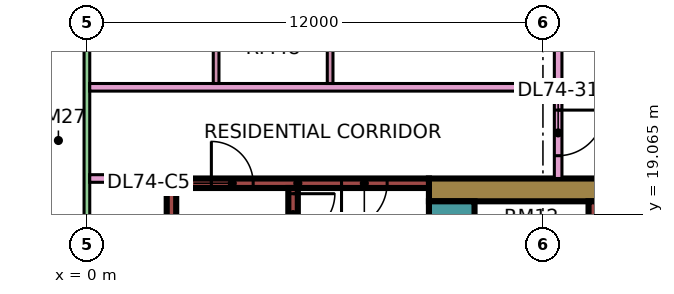
"""IFC4 building model, lengths in metres.
Left out: names, types, materials, properties, quantities, classifications, styles, units other than length and angle.
Written with IfcOpenShell. Run it as: python <this file> out.ifc"""

import sys

from ifc_helpers import new_model, si_unit, direction, frame, frame_2d, origin, place, context, subcontext, project, spatial, rectangle, extrude, element, fill, save


model = new_model("IFC4")
c1 = context("Model", 3, precision=1e-05, world=origin(), true_north=direction((0.0, 1.0)))
c2 = subcontext(c1, "Body", "Model", "MODEL_VIEW")
j1 = project(units=[si_unit("LENGTHUNIT", "METRE"), si_unit("PLANEANGLEUNIT", "RADIAN")], contexts=[c1])
p1 = place(None, origin())
s1 = spatial("IfcSite", under=j1, at=p1, CompositionType="ELEMENT")
p2 = place(p1, origin())
s2 = spatial("IfcBuilding", under=s1, at=p2, CompositionType="ELEMENT")
p3 = place(p2, frame((0.0, 0.0, 314.65)))
s3 = spatial("IfcBuildingStorey", under=s2, at=p3, CompositionType="ELEMENT", Elevation=314.65)
p4 = place(p3, frame((9.0, 19.7, 0.0), z_axis=(0.0, 0.0, 1.0), x_axis=(1.0, 0.0, 0.0)))
e1 = element("IfcWall", 1, at=p4, inside=s3, PredefinedType="SHEAR", context=c2, shape_type="SweptSolid", body=[
    extrude(rectangle(XDim=25.0, YDim=0.6, at=frame_2d((12.5, 0.0))), origin(), (0.0, 0.0, 1.0), 3.75),
])
p5 = place(p4, frame((19.1, 0.0, 0.0)))
e2 = element("IfcOpeningElement", 2, at=p5, cuts=e1, PredefinedType="OPENING", context=c2, shape_type="SweptSolid", body=[
    extrude(rectangle(XDim=1.8, YDim=2.4, at=frame_2d((0.9, 1.2))), frame((0.0, 0.31, 0.0), z_axis=(0.0, -1.0, 0.0), x_axis=(1.0, 0.0, 0.0)), (0.0, 0.0, 1.0), 0.62),
])
p6 = place(p3, frame((9.6, 7.6, 0.0), z_axis=(0.0, 0.0, 1.0), x_axis=(0.0, 1.0, 0.0)))
e3 = element("IfcWall", 3, at=p6, inside=s3, PredefinedType="SHEAR", context=c2, shape_type="SweptSolid", body=[
    extrude(rectangle(XDim=11.8, YDim=1.2, at=frame_2d((5.9, 0.0))), origin(), (0.0, 0.0, 1.0), 3.75),
])
p7 = place(p6, frame((4.275, 0.0, 0.0)))
e4 = element("IfcOpeningElement", 4, at=p7, cuts=e3, PredefinedType="OPENING", context=c2, shape_type="SweptSolid", body=[
    extrude(rectangle(XDim=1.1, YDim=2.2, at=frame_2d((0.55, 1.1))), frame((0.0, 0.61, 0.0), z_axis=(0.0, -1.0, 0.0), x_axis=(1.0, 0.0, 0.0)), (0.0, 0.0, 1.0), 1.22),
])
p8 = place(p6, frame((6.775, 0.0, 0.0)))
e5 = element("IfcOpeningElement", 5, at=p8, cuts=e3, PredefinedType="OPENING", context=c2, shape_type="SweptSolid", body=[
    extrude(rectangle(XDim=1.1, YDim=2.2, at=frame_2d((0.55, 1.1))), frame((0.0, 0.61, 0.0), z_axis=(0.0, -1.0, 0.0), x_axis=(1.0, 0.0, 0.0)), (0.0, 0.0, 1.0), 1.22),
])
p9 = place(p6, frame((9.7, 0.0, 0.0)))
e6 = element("IfcOpeningElement", 6, at=p9, cuts=e3, PredefinedType="OPENING", context=c2, shape_type="SweptSolid", body=[
    extrude(rectangle(XDim=1.1, YDim=2.2, at=frame_2d((0.55, 1.1))), frame((0.0, 0.61, 0.0), z_axis=(0.0, -1.0, 0.0), x_axis=(1.0, 0.0, 0.0)), (0.0, 0.0, 1.0), 1.22),
])
p10 = place(p6, frame((1.95, 0.0, 0.0)))
e7 = element("IfcOpeningElement", 7, at=p10, cuts=e3, PredefinedType="OPENING", context=c2, shape_type="SweptSolid", body=[
    extrude(rectangle(XDim=0.9, YDim=2.1, at=frame_2d((0.45, 1.05))), frame((0.0, 0.61, 0.0), z_axis=(0.0, -1.0, 0.0), x_axis=(1.0, 0.0, 0.0)), (0.0, 0.0, 1.0), 1.22),
])
p11 = place(p3, frame((13.325, 7.6, 0.0), z_axis=(0.0, 0.0, 1.0), x_axis=(0.0, 1.0, 0.0)))
e8 = element("IfcWall", 8, at=p11, inside=s3, PredefinedType="SHEAR", context=c2, shape_type="SweptSolid", body=[
    extrude(rectangle(XDim=11.8, YDim=0.25, at=frame_2d((5.9, 0.0))), origin(), (0.0, 0.0, 1.0), 3.75),
])
p12 = place(p3, frame((2.1, 19.875, 0.0), z_axis=(0.0, 0.0, 1.0), x_axis=(1.0, 0.0, 0.0)))
e9 = element("IfcWall", 9, at=p12, inside=s3, PredefinedType="SHEAR", context=c2, shape_type="SweptSolid", body=[
    extrude(rectangle(XDim=6.9, YDim=0.25, at=frame_2d((3.45, 0.0))), origin(), (0.0, 0.0, 1.0), 3.75),
])
p13 = place(p12, frame((1.175, 0.0, 0.0)))
e10 = element("IfcOpeningElement", 10, at=p13, cuts=e9, PredefinedType="OPENING", context=c2, shape_type="SweptSolid", body=[
    extrude(rectangle(XDim=1.1, YDim=2.2, at=frame_2d((0.55, 1.1))), frame((0.0, 0.135, 0.0), z_axis=(0.0, -1.0, 0.0), x_axis=(1.0, 0.0, 0.0)), (0.0, 0.0, 1.0), 0.27),
])
p14 = place(p12, frame((4.6, 0.0, 0.0)))
e11 = element("IfcOpeningElement", 11, at=p14, cuts=e9, PredefinedType="OPENING", context=c2, shape_type="SweptSolid", body=[
    extrude(rectangle(XDim=1.2, YDim=2.2, at=frame_2d((0.6, 1.1))), frame((0.0, 0.135, 0.0), z_axis=(0.0, -1.0, 0.0), x_axis=(1.0, 0.0, 0.0)), (0.0, 0.0, 1.0), 0.27),
])
p15 = place(p3, frame((2.225, 13.25, 0.0), z_axis=(0.0, 0.0, 1.0), x_axis=(0.0, 1.0, 0.0)))
e12 = element("IfcWall", 12, at=p15, inside=s3, PredefinedType="SHEAR", context=c2, shape_type="SweptSolid", body=[
    extrude(rectangle(XDim=6.5, YDim=0.25, at=frame_2d((3.25, 0.0))), origin(), (0.0, 0.0, 1.0), 3.75),
])
p16 = place(p3, frame((5.425, 13.25, 0.0), z_axis=(0.0, 0.0, 1.0), x_axis=(0.0, 1.0, 0.0)))
e13 = element("IfcWall", 13, at=p16, inside=s3, PredefinedType="SHEAR", context=c2, shape_type="SweptSolid", body=[
    extrude(rectangle(XDim=6.5, YDim=0.25, at=frame_2d((3.25, 0.0))), origin(), (0.0, 0.0, 1.0), 3.75),
])
p17 = place(p16, frame((5.25, 0.0, 0.0)))
e14 = element("IfcOpeningElement", 14, at=p17, cuts=e13, PredefinedType="OPENING", context=c2, shape_type="SweptSolid", body=[
    extrude(rectangle(XDim=1.1, YDim=2.2, at=frame_2d((0.55, 1.1))), frame((0.0, 0.135, 0.0), z_axis=(0.0, -1.0, 0.0), x_axis=(1.0, 0.0, 0.0)), (0.0, 0.0, 1.0), 0.27),
])
p18 = place(p3, frame((0.0, 23.925, 0.0), z_axis=(0.0, 0.0, 1.0), x_axis=(0.0, -1.0, 0.0)))
e15 = element("IfcWall", 15, at=p18, inside=s3, PredefinedType="SOLIDWALL", context=c2, shape_type="SweptSolid", body=[
    extrude(rectangle(XDim=11.35, YDim=0.15, at=frame_2d((5.675, 0.0))), origin(), (0.0, 0.0, 1.0), 3.35),
])
p19 = place(p18, frame((6.738, 0.0, 0.0)))
e16 = element("IfcOpeningElement", 16, at=p19, cuts=e15, PredefinedType="OPENING", context=c2, shape_type="SweptSolid", body=[
    extrude(rectangle(XDim=1.8, YDim=2.4, at=frame_2d((0.9, 1.2))), frame((0.0, 0.085, 0.0), z_axis=(0.0, -1.0, 0.0), x_axis=(1.0, 0.0, 0.0)), (0.0, 0.0, 1.0), 0.17),
])
p20 = place(p3, frame((0.074, 20.0, 0.0), z_axis=(0.0, 0.0, 1.0), x_axis=(1.0, 0.0, 0.0)))
e17 = element("IfcWall", 17, at=p20, inside=s3, PredefinedType="PARTITIONING", context=c2, shape_type="SweptSolid", body=[
    extrude(rectangle(XDim=2.026, YDim=0.2, at=frame_2d((1.013, 0.0))), origin(), (0.0, 0.0, 1.0), 3.35),
])
p21 = place(p3, frame((0.074, 22.4, 0.0), z_axis=(0.0, 0.0, 1.0), x_axis=(1.0, 0.0, 0.0)))
e18 = element("IfcWall", 18, at=p21, inside=s3, PredefinedType="PARTITIONING", context=c2, shape_type="SweptSolid", body=[
    extrude(rectangle(XDim=12.226, YDim=0.2, at=frame_2d((6.113, 0.0))), origin(), (0.0, 0.0, 1.0), 3.35),
])
p22 = place(p3, frame((3.4, 22.5, 0.0), z_axis=(0.0, 0.0, 1.0), x_axis=(0.0, 1.0, 0.0)))
e19 = element("IfcWall", 19, at=p22, inside=s3, PredefinedType="PARTITIONING", context=c2, shape_type="SweptSolid", body=[
    extrude(rectangle(XDim=2.825, YDim=0.15, at=frame_2d((1.413, 0.0))), origin(), (0.0, 0.0, 1.0), 3.35),
])
p23 = place(p22, frame((0.95, 0.0, 0.0)))
e20 = element("IfcOpeningElement", 20, at=p23, cuts=e19, PredefinedType="OPENING", context=c2, shape_type="SweptSolid", body=[
    extrude(rectangle(XDim=0.8, YDim=2.1, at=frame_2d((0.4, 1.05))), frame((0.0, 0.085, 0.0), z_axis=(0.0, -1.0, 0.0), x_axis=(1.0, 0.0, 0.0)), (0.0, 0.0, 1.0), 0.17),
])
p24 = place(p3, frame((6.4, 22.5, 0.0), z_axis=(0.0, 0.0, 1.0), x_axis=(0.0, 1.0, 0.0)))
e21 = element("IfcWall", 21, at=p24, inside=s3, PredefinedType="PARTITIONING", context=c2, shape_type="SweptSolid", body=[
    extrude(rectangle(XDim=7.55, YDim=0.15, at=frame_2d((3.775, 0.0))), origin(), (0.0, 0.0, 1.0), 3.35),
])
p25 = place(p3, frame((12.4, 20.0, 0.0), z_axis=(0.0, 0.0, 1.0), x_axis=(0.0, 1.0, 0.0)))
e22 = element("IfcWall", 22, at=p25, inside=s3, PredefinedType="PARTITIONING", context=c2, shape_type="SweptSolid", body=[
    extrude(rectangle(XDim=33.926, YDim=0.2, at=frame_2d((16.963, 0.0))), origin(), (0.0, 0.0, 1.0), 3.35),
])
p26 = place(p25, frame((31.8, 0.0, 0.0)))
e23 = element("IfcOpeningElement", 23, at=p26, cuts=e22, PredefinedType="OPENING", context=c2, shape_type="SweptSolid", body=[
    extrude(rectangle(XDim=1.0, YDim=2.1, at=frame_2d((0.5, 1.05))), frame((0.0, 0.11, 0.0), z_axis=(0.0, -1.0, 0.0), x_axis=(1.0, 0.0, 0.0)), (0.0, 0.0, 1.0), 0.22),
])
p27 = place(p25, frame((0.6, 0.0, 0.0)))
e24 = element("IfcOpeningElement", 24, at=p27, cuts=e22, PredefinedType="OPENING", context=c2, shape_type="SweptSolid", body=[
    extrude(rectangle(XDim=1.2, YDim=2.1, at=frame_2d((0.6, 1.05))), frame((0.0, 0.11, 0.0), z_axis=(0.0, -1.0, 0.0), x_axis=(1.0, 0.0, 0.0)), (0.0, 0.0, 1.0), 0.22),
])
p28 = place(p25, frame((4.5, 0.0, 0.0)))
e25 = element("IfcOpeningElement", 25, at=p28, cuts=e22, PredefinedType="OPENING", context=c2, shape_type="SweptSolid", body=[
    extrude(rectangle(XDim=1.0, YDim=2.1, at=frame_2d((0.5, 1.05))), frame((0.0, 0.11, 0.0), z_axis=(0.0, -1.0, 0.0), x_axis=(1.0, 0.0, 0.0)), (0.0, 0.0, 1.0), 0.22),
])
p29 = place(p17, origin())
e26 = element("IfcDoor", 26, at=p29, inside=s3, OperationType="SINGLE_SWING_RIGHT", PredefinedType="DOOR", context=c2, shape_type="SweptSolid", body=[
    extrude(rectangle(XDim=1.1, YDim=2.2, at=frame_2d((0.55, 1.1))), frame((0.0, 0.025, 0.0), z_axis=(0.0, -1.0, 0.0), x_axis=(1.0, 0.0, 0.0)), (0.0, 0.0, 1.0), 0.05),
])
fill(e14, e26)
p30 = place(p13, origin())
e27 = element("IfcDoor", 27, at=p30, inside=s3, OperationType="SINGLE_SWING_LEFT", PredefinedType="DOOR", context=c2, shape_type="SweptSolid", body=[
    extrude(rectangle(XDim=1.1, YDim=2.2, at=frame_2d((0.55, 1.1))), frame((0.0, 0.025, 0.0), z_axis=(0.0, -1.0, 0.0), x_axis=(1.0, 0.0, 0.0)), (0.0, 0.0, 1.0), 0.05),
])
fill(e10, e27)
p31 = place(p14, frame((1.2, 0.0, 0.0), z_axis=(0.0, 0.0, 1.0), x_axis=(-1.0, 0.0, 0.0)))
e28 = element("IfcDoor", 28, at=p31, inside=s3, OperationType="SINGLE_SWING_LEFT", PredefinedType="DOOR", context=c2, shape_type="SweptSolid", body=[
    extrude(rectangle(XDim=1.2, YDim=2.2, at=frame_2d((0.6, 1.1))), frame((0.0, 0.025, 0.0), z_axis=(0.0, -1.0, 0.0), x_axis=(1.0, 0.0, 0.0)), (0.0, 0.0, 1.0), 0.05),
])
fill(e11, e28)
p32 = place(p27, origin())
e29 = element("IfcDoor", 29, at=p32, inside=s3, OperationType="SINGLE_SWING_RIGHT", PredefinedType="DOOR", context=c2, shape_type="SweptSolid", body=[
    extrude(rectangle(XDim=1.2, YDim=2.1, at=frame_2d((0.6, 1.05))), frame((0.0, 0.025, 0.0), z_axis=(0.0, -1.0, 0.0), x_axis=(1.0, 0.0, 0.0)), (0.0, 0.0, 1.0), 0.05),
])
fill(e24, e29)
save(model, sys.argv[1])
